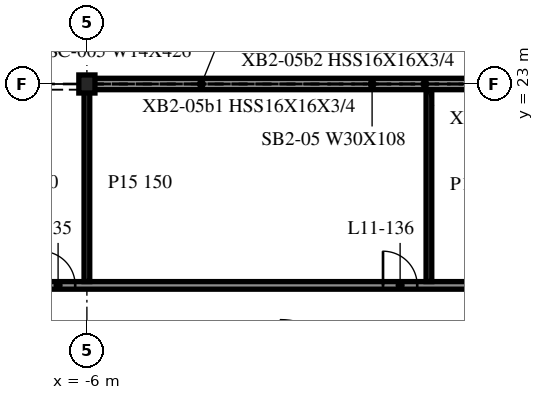
"""IFC4 building model, lengths in metres.
Left out: names, types, materials, properties, quantities, classifications, styles, units other than length and angle.
Written with IfcOpenShell. Run it as: python <this file> out.ifc"""

import sys

from ifc_helpers import new_model, si_unit, direction, frame, frame_2d, origin, origin_2d, place, context, subcontext, project, spatial, rectangle, i_section, extrude, element, fill, save


model = new_model("IFC4")
c1 = context("Model", 3, precision=1e-05, world=origin(), true_north=direction((0.0, 1.0)))
c2 = subcontext(c1, "Body", "Model", "MODEL_VIEW")
j1 = project(units=[si_unit("LENGTHUNIT", "METRE"), si_unit("PLANEANGLEUNIT", "RADIAN")], contexts=[c1])
p1 = place(None, origin())
s1 = spatial("IfcSite", under=j1, at=p1, CompositionType="ELEMENT")
p2 = place(p1, origin())
s2 = spatial("IfcBuilding", under=s1, at=p2, CompositionType="ELEMENT")
p3 = place(p2, frame((0.0, 0.0, 50.3)))
s3 = spatial("IfcBuildingStorey", under=s2, at=p3, CompositionType="ELEMENT", Elevation=50.3)
p4 = place(p3, frame((-6.0, 23.0, -0.34), z_axis=(0.0, 0.0, 1.0), x_axis=(1.0, 0.0, 0.0)))
e1 = element("IfcColumn", 1, at=p4, inside=s3, PredefinedType="COLUMN", context=c2, shape_type="SweptSolid", body=[
    extrude(i_section(OverallWidth=0.424, OverallDepth=0.475, WebThickness=0.048, FlangeThickness=0.077, at=origin_2d()), origin(), (0.0, 0.0, 1.0), 4.3),
])
p5 = place(p3, frame((5.976, 23.0, 0.0), z_axis=(0.0, 0.0, 1.0), x_axis=(-1.0, 0.0, 0.0)))
e2 = element("IfcWall", 2, at=p5, inside=s3, PredefinedType="NOTDEFINED", context=c2, shape_type="SweptSolid", body=[
    extrude(rectangle(XDim=11.952, YDim=0.3, at=frame_2d((5.976, 0.0))), origin(), (0.0, 0.0, 1.0), 3.203),
])
p6 = place(p3, frame((-41.708, 17.7, 0.0), z_axis=(0.0, 0.0, 1.0), x_axis=(1.0, 0.0, 0.0)))
e3 = element("IfcWall", 3, at=p6, inside=s3, PredefinedType="PARTITIONING", context=c2, shape_type="SweptSolid", body=[
    extrude(rectangle(XDim=95.416, YDim=0.2, at=frame_2d((47.708, 0.0))), origin(), (0.0, 0.0, 1.0), 3.96),
])
p7 = place(p6, frame((7.5, 0.0, 0.0)))
e4 = element("IfcOpeningElement", 4, at=p7, cuts=e3, PredefinedType="OPENING", context=c2, shape_type="SweptSolid", body=[
    extrude(rectangle(XDim=0.9, YDim=2.1, at=frame_2d((0.45, 1.05))), frame((0.0, 0.11, 0.0), z_axis=(0.0, -1.0, 0.0), x_axis=(1.0, 0.0, 0.0)), (0.0, 0.0, 1.0), 0.22),
])
p8 = place(p6, frame((13.5, 0.0, 0.0)))
e5 = element("IfcOpeningElement", 5, at=p8, cuts=e3, PredefinedType="OPENING", context=c2, shape_type="SweptSolid", body=[
    extrude(rectangle(XDim=0.9, YDim=2.1, at=frame_2d((0.45, 1.05))), frame((0.0, 0.11, 0.0), z_axis=(0.0, -1.0, 0.0), x_axis=(1.0, 0.0, 0.0)), (0.0, 0.0, 1.0), 0.22),
])
p9 = place(p6, frame((19.5, 0.0, 0.0)))
e6 = element("IfcOpeningElement", 6, at=p9, cuts=e3, PredefinedType="OPENING", context=c2, shape_type="SweptSolid", body=[
    extrude(rectangle(XDim=0.9, YDim=2.1, at=frame_2d((0.45, 1.05))), frame((0.0, 0.11, 0.0), z_axis=(0.0, -1.0, 0.0), x_axis=(1.0, 0.0, 0.0)), (0.0, 0.0, 1.0), 0.22),
])
p10 = place(p6, frame((31.5, 0.0, 0.0)))
e7 = element("IfcOpeningElement", 7, at=p10, cuts=e3, PredefinedType="OPENING", context=c2, shape_type="SweptSolid", body=[
    extrude(rectangle(XDim=0.9, YDim=2.1, at=frame_2d((0.45, 1.05))), frame((0.0, 0.11, 0.0), z_axis=(0.0, -1.0, 0.0), x_axis=(1.0, 0.0, 0.0)), (0.0, 0.0, 1.0), 0.22),
])
p11 = place(p6, frame((34.5, 0.0, 0.0)))
e8 = element("IfcOpeningElement", 8, at=p11, cuts=e3, PredefinedType="OPENING", context=c2, shape_type="SweptSolid", body=[
    extrude(rectangle(XDim=0.9, YDim=2.1, at=frame_2d((0.45, 1.05))), frame((0.0, 0.11, 0.0), z_axis=(0.0, -1.0, 0.0), x_axis=(1.0, 0.0, 0.0)), (0.0, 0.0, 1.0), 0.22),
])
p12 = place(p6, frame((43.5, 0.0, 0.0)))
e9 = element("IfcOpeningElement", 9, at=p12, cuts=e3, PredefinedType="OPENING", context=c2, shape_type="SweptSolid", body=[
    extrude(rectangle(XDim=0.9, YDim=2.1, at=frame_2d((0.45, 1.05))), frame((0.0, 0.11, 0.0), z_axis=(0.0, -1.0, 0.0), x_axis=(1.0, 0.0, 0.0)), (0.0, 0.0, 1.0), 0.22),
])
p13 = place(p6, frame((47.3, 0.0, 0.0)))
e10 = element("IfcOpeningElement", 10, at=p13, cuts=e3, PredefinedType="OPENING", context=c2, shape_type="SweptSolid", body=[
    extrude(rectangle(XDim=0.9, YDim=2.1, at=frame_2d((0.45, 1.05))), frame((0.0, 0.11, 0.0), z_axis=(0.0, -1.0, 0.0), x_axis=(1.0, 0.0, 0.0)), (0.0, 0.0, 1.0), 0.22),
])
p14 = place(p6, frame((51.1, 0.0, 0.0)))
e11 = element("IfcOpeningElement", 11, at=p14, cuts=e3, PredefinedType="OPENING", context=c2, shape_type="SweptSolid", body=[
    extrude(rectangle(XDim=0.9, YDim=2.1, at=frame_2d((0.45, 1.05))), frame((0.0, 0.11, 0.0), z_axis=(0.0, -1.0, 0.0), x_axis=(1.0, 0.0, 0.0)), (0.0, 0.0, 1.0), 0.22),
])
p15 = place(p6, frame((57.1, 0.0, 0.0)))
e12 = element("IfcOpeningElement", 12, at=p15, cuts=e3, PredefinedType="OPENING", context=c2, shape_type="SweptSolid", body=[
    extrude(rectangle(XDim=0.9, YDim=2.1, at=frame_2d((0.45, 1.05))), frame((0.0, 0.11, 0.0), z_axis=(0.0, -1.0, 0.0), x_axis=(1.0, 0.0, 0.0)), (0.0, 0.0, 1.0), 0.22),
])
p16 = place(p6, frame((69.1, 0.0, 0.0)))
e13 = element("IfcOpeningElement", 13, at=p16, cuts=e3, PredefinedType="OPENING", context=c2, shape_type="SweptSolid", body=[
    extrude(rectangle(XDim=0.9, YDim=2.1, at=frame_2d((0.45, 1.05))), frame((0.0, 0.11, 0.0), z_axis=(0.0, -1.0, 0.0), x_axis=(1.0, 0.0, 0.0)), (0.0, 0.0, 1.0), 0.22),
])
p17 = place(p6, frame((72.1, 0.0, 0.0)))
e14 = element("IfcOpeningElement", 14, at=p17, cuts=e3, PredefinedType="OPENING", context=c2, shape_type="SweptSolid", body=[
    extrude(rectangle(XDim=0.9, YDim=2.1, at=frame_2d((0.45, 1.05))), frame((0.0, 0.11, 0.0), z_axis=(0.0, -1.0, 0.0), x_axis=(1.0, 0.0, 0.0)), (0.0, 0.0, 1.0), 0.22),
])
p18 = place(p6, frame((81.1, 0.0, 0.0)))
e15 = element("IfcOpeningElement", 15, at=p18, cuts=e3, PredefinedType="OPENING", context=c2, shape_type="SweptSolid", body=[
    extrude(rectangle(XDim=0.9, YDim=2.1, at=frame_2d((0.45, 1.05))), frame((0.0, 0.11, 0.0), z_axis=(0.0, -1.0, 0.0), x_axis=(1.0, 0.0, 0.0)), (0.0, 0.0, 1.0), 0.22),
])
p19 = place(p6, frame((87.1, 0.0, 0.0)))
e16 = element("IfcOpeningElement", 16, at=p19, cuts=e3, PredefinedType="OPENING", context=c2, shape_type="SweptSolid", body=[
    extrude(rectangle(XDim=0.9, YDim=2.1, at=frame_2d((0.45, 1.05))), frame((0.0, 0.11, 0.0), z_axis=(0.0, -1.0, 0.0), x_axis=(1.0, 0.0, 0.0)), (0.0, 0.0, 1.0), 0.22),
])
p20 = place(p3, frame((-6.0, 17.8, 0.0), z_axis=(0.0, 0.0, 1.0), x_axis=(0.0, 1.0, 0.0)))
e17 = element("IfcWall", 17, at=p20, inside=s3, PredefinedType="PARTITIONING", context=c2, shape_type="SweptSolid", body=[
    extrude(rectangle(XDim=5.175, YDim=0.15, at=frame_2d((2.587, 0.0))), origin(), (0.0, 0.0, 1.0), 3.96),
])
p21 = place(p3, frame((3.0, 17.8, 0.0), z_axis=(0.0, 0.0, 1.0), x_axis=(0.0, 1.0, 0.0)))
e18 = element("IfcWall", 18, at=p21, inside=s3, PredefinedType="PARTITIONING", context=c2, shape_type="SweptSolid", body=[
    extrude(rectangle(XDim=5.05, YDim=0.15, at=frame_2d((2.525, 0.0))), origin(), (0.0, 0.0, 1.0), 3.96),
])
p22 = place(p11, origin())
e19 = element("IfcDoor", 19, at=p22, inside=s3, OperationType="SINGLE_SWING_LEFT", PredefinedType="DOOR", context=c2, shape_type="SweptSolid", body=[
    extrude(rectangle(XDim=0.9, YDim=2.1, at=frame_2d((0.45, 1.05))), frame((0.0, 0.025, 0.0), z_axis=(0.0, -1.0, 0.0), x_axis=(1.0, 0.0, 0.0)), (0.0, 0.0, 1.0), 0.05),
])
fill(e8, e19)
p23 = place(p12, origin())
e20 = element("IfcDoor", 20, at=p23, inside=s3, OperationType="SINGLE_SWING_LEFT", PredefinedType="DOOR", context=c2, shape_type="SweptSolid", body=[
    extrude(rectangle(XDim=0.9, YDim=2.1, at=frame_2d((0.45, 1.05))), frame((0.0, 0.025, 0.0), z_axis=(0.0, -1.0, 0.0), x_axis=(1.0, 0.0, 0.0)), (0.0, 0.0, 1.0), 0.05),
])
fill(e9, e20)
save(model, sys.argv[1])
